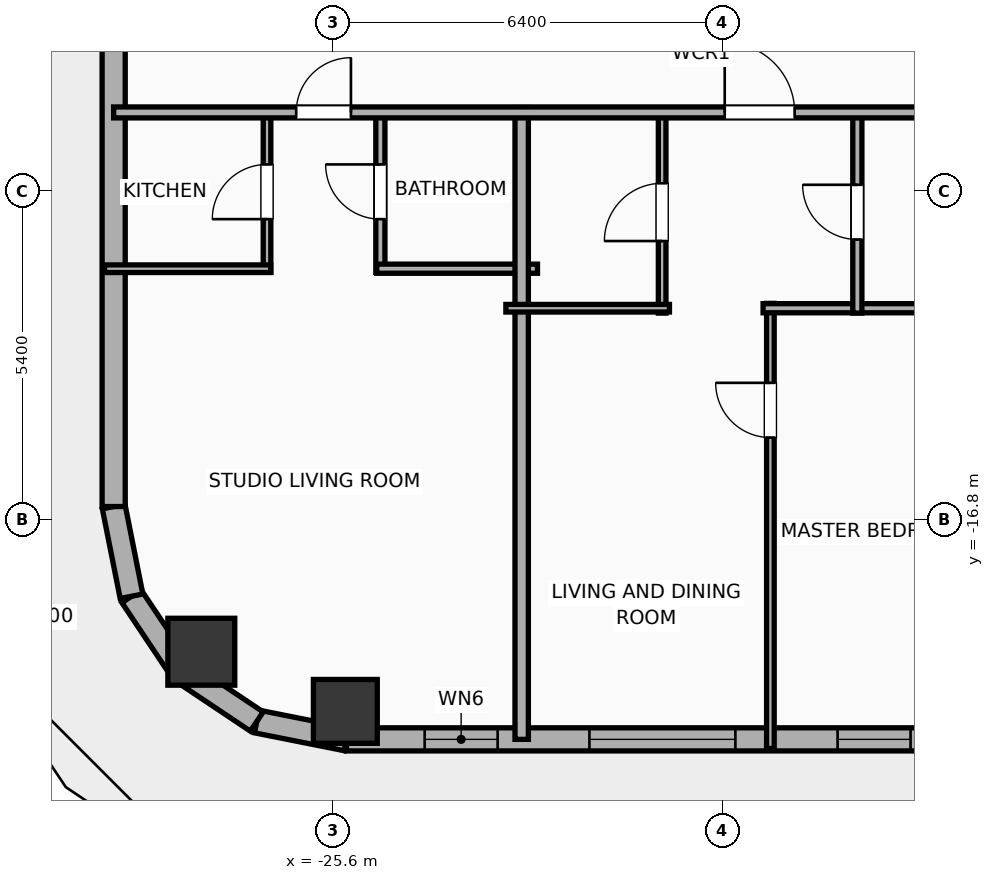
"""IFC4 building model, lengths in metres.
Left out: names, types, materials, properties, quantities, classifications, styles, units other than length and angle.
Written with IfcOpenShell. Run it as: python <this file> out.ifc"""

import sys

from ifc_helpers import new_model, si_unit, direction, frame, frame_2d, origin, origin_2d, place, context, subcontext, project, spatial, rectangle, hollow_rectangle, hollow_circle, extrude, element, fill, save


model = new_model("IFC4")
c1 = context("Model", 3, precision=1e-05, world=origin(), true_north=direction((0.0, 1.0)))
c2 = subcontext(c1, "Body", "Model", "MODEL_VIEW")
j1 = project(units=[si_unit("LENGTHUNIT", "METRE"), si_unit("PLANEANGLEUNIT", "RADIAN")], contexts=[c1])
p1 = place(None, origin())
s1 = spatial("IfcSite", under=j1, at=p1, CompositionType="ELEMENT")
p2 = place(p1, origin())
s2 = spatial("IfcBuilding", under=s1, at=p2, CompositionType="ELEMENT")
p3 = place(p2, frame((0.0, 0.0, 113.1)))
s3 = spatial("IfcBuildingStorey", under=s2, at=p3, CompositionType="ELEMENT", Elevation=113.1)
p4 = place(p3, frame((-25.4, -19.95, 0.0), z_axis=(0.0, 0.0, 1.0), x_axis=(1.0, 0.0, 0.0)))
e1 = element("IfcColumn", 1, at=p4, inside=s3, PredefinedType="COLUMN", context=c2, shape_type="SweptSolid", body=[
    extrude(hollow_rectangle(XDim=1.05, YDim=1.05, WallThickness=0.036, at=origin_2d()), origin(), (0.0, 0.0, 1.0), 3.9),
])
p5 = place(p3, frame((-27.769, -18.969, 0.0), z_axis=(0.0, 0.0, 1.0), x_axis=(1.0, 0.0, 0.0)))
e2 = element("IfcColumn", 2, at=p5, inside=s3, PredefinedType="COLUMN", context=c2, shape_type="SweptSolid", body=[
    extrude(hollow_circle(Radius=0.55, WallThickness=0.036, at=origin_2d()), origin(), (0.0, 0.0, 1.0), 3.9),
])
p6 = place(p3, frame((29.381, -20.41, 0.0), z_axis=(0.0, 0.0, 1.0), x_axis=(-1.0, 0.0, 0.0)))
e3 = element("IfcWall", 3, at=p6, inside=s3, PredefinedType="ELEMENTEDWALL", context=c2, shape_type="SweptSolid", body=[
    extrude(rectangle(XDim=54.763, YDim=0.38, at=frame_2d((27.381, 0.0))), origin(), (0.0, 0.0, 1.0), 3.65),
])
p7 = place(p6, frame((15.679, 0.0, 0.0)))
e4 = element("IfcOpeningElement", 4, at=p7, cuts=e3, PredefinedType="OPENING", context=c2, shape_type="SweptSolid", body=[
    extrude(rectangle(XDim=1.5, YDim=2.05, at=frame_2d((0.75, 1.025))), frame((0.0, 0.2, 0.0), z_axis=(0.0, -1.0, 0.0), x_axis=(1.0, 0.0, 0.0)), (0.0, 0.0, 1.0), 0.4),
])
p8 = place(p6, frame((7.295, 0.0, 0.75)))
e5 = element("IfcOpeningElement", 5, at=p8, cuts=e3, PredefinedType="OPENING", context=c2, shape_type="SweptSolid", body=[
    extrude(rectangle(XDim=2.4, YDim=2.1, at=frame_2d((1.2, 1.05))), frame((0.0, 0.2, 0.0), z_axis=(0.0, -1.0, 0.0), x_axis=(1.0, 0.0, 0.0)), (0.0, 0.0, 1.0), 0.4),
])
p9 = place(p6, frame((18.486, 0.0, 0.75)))
e6 = element("IfcOpeningElement", 6, at=p9, cuts=e3, PredefinedType="OPENING", context=c2, shape_type="SweptSolid", body=[
    extrude(rectangle(XDim=2.4, YDim=2.1, at=frame_2d((1.2, 1.05))), frame((0.0, 0.2, 0.0), z_axis=(0.0, -1.0, 0.0), x_axis=(1.0, 0.0, 0.0)), (0.0, 0.0, 1.0), 0.4),
])
p10 = place(p6, frame((33.877, 0.0, 0.75)))
e7 = element("IfcOpeningElement", 7, at=p10, cuts=e3, PredefinedType="OPENING", context=c2, shape_type="SweptSolid", body=[
    extrude(rectangle(XDim=2.4, YDim=2.1, at=frame_2d((1.2, 1.05))), frame((0.0, 0.2, 0.0), z_axis=(0.0, -1.0, 0.0), x_axis=(1.0, 0.0, 0.0)), (0.0, 0.0, 1.0), 0.4),
])
p11 = place(p6, frame((48.367, 0.0, 0.75)))
e8 = element("IfcOpeningElement", 8, at=p11, cuts=e3, PredefinedType="OPENING", context=c2, shape_type="SweptSolid", body=[
    extrude(rectangle(XDim=2.4, YDim=2.1, at=frame_2d((1.2, 1.05))), frame((0.0, 0.2, 0.0), z_axis=(0.0, -1.0, 0.0), x_axis=(1.0, 0.0, 0.0)), (0.0, 0.0, 1.0), 0.4),
])
p12 = place(p6, frame((37.584, 0.0, 0.0)))
e9 = element("IfcOpeningElement", 9, at=p12, cuts=e3, PredefinedType="OPENING", context=c2, shape_type="SweptSolid", body=[
    extrude(rectangle(XDim=1.5, YDim=2.05, at=frame_2d((0.75, 1.025))), frame((0.0, 0.2, 0.0), z_axis=(0.0, -1.0, 0.0), x_axis=(1.0, 0.0, 0.0)), (0.0, 0.0, 1.0), 0.4),
])
p13 = place(p6, frame((52.277, 0.0, 0.75)))
e10 = element("IfcOpeningElement", 10, at=p13, cuts=e3, PredefinedType="OPENING", context=c2, shape_type="SweptSolid", body=[
    extrude(rectangle(XDim=1.2, YDim=2.05, at=frame_2d((0.6, 1.025))), frame((0.0, 0.2, 0.0), z_axis=(0.0, -1.0, 0.0), x_axis=(1.0, 0.0, 0.0)), (0.0, 0.0, 1.0), 0.4),
])
p14 = place(p6, frame((45.486, 0.0, 0.75)))
e11 = element("IfcOpeningElement", 11, at=p14, cuts=e3, PredefinedType="OPENING", context=c2, shape_type="SweptSolid", body=[
    extrude(rectangle(XDim=1.2, YDim=2.05, at=frame_2d((0.6, 1.025))), frame((0.0, 0.2, 0.0), z_axis=(0.0, -1.0, 0.0), x_axis=(1.0, 0.0, 0.0)), (0.0, 0.0, 1.0), 0.4),
])
p15 = place(p6, frame((41.736, 0.0, 0.75)))
e12 = element("IfcOpeningElement", 12, at=p15, cuts=e3, PredefinedType="OPENING", context=c2, shape_type="SweptSolid", body=[
    extrude(rectangle(XDim=1.2, YDim=2.05, at=frame_2d((0.6, 1.025))), frame((0.0, 0.2, 0.0), z_axis=(0.0, -1.0, 0.0), x_axis=(1.0, 0.0, 0.0)), (0.0, 0.0, 1.0), 0.4),
])
p16 = place(p6, frame((30.486, 0.0, 0.75)))
e13 = element("IfcOpeningElement", 13, at=p16, cuts=e3, PredefinedType="OPENING", context=c2, shape_type="SweptSolid", body=[
    extrude(rectangle(XDim=1.2, YDim=2.05, at=frame_2d((0.6, 1.025))), frame((0.0, 0.2, 0.0), z_axis=(0.0, -1.0, 0.0), x_axis=(1.0, 0.0, 0.0)), (0.0, 0.0, 1.0), 0.4),
])
p17 = place(p6, frame((26.736, 0.0, 0.75)))
e14 = element("IfcOpeningElement", 14, at=p17, cuts=e3, PredefinedType="OPENING", context=c2, shape_type="SweptSolid", body=[
    extrude(rectangle(XDim=1.2, YDim=2.05, at=frame_2d((0.6, 1.025))), frame((0.0, 0.2, 0.0), z_axis=(0.0, -1.0, 0.0), x_axis=(1.0, 0.0, 0.0)), (0.0, 0.0, 1.0), 0.4),
])
p18 = place(p6, frame((22.986, 0.0, 0.75)))
e15 = element("IfcOpeningElement", 15, at=p18, cuts=e3, PredefinedType="OPENING", context=c2, shape_type="SweptSolid", body=[
    extrude(rectangle(XDim=1.2, YDim=2.05, at=frame_2d((0.6, 1.025))), frame((0.0, 0.2, 0.0), z_axis=(0.0, -1.0, 0.0), x_axis=(1.0, 0.0, 0.0)), (0.0, 0.0, 1.0), 0.4),
])
p19 = place(p6, frame((11.736, 0.0, 0.75)))
e16 = element("IfcOpeningElement", 16, at=p19, cuts=e3, PredefinedType="OPENING", context=c2, shape_type="SweptSolid", body=[
    extrude(rectangle(XDim=1.2, YDim=2.05, at=frame_2d((0.6, 1.025))), frame((0.0, 0.2, 0.0), z_axis=(0.0, -1.0, 0.0), x_axis=(1.0, 0.0, 0.0)), (0.0, 0.0, 1.0), 0.4),
])
p20 = place(p6, frame((3.286, 0.0, 0.75)))
e17 = element("IfcOpeningElement", 17, at=p20, cuts=e3, PredefinedType="OPENING", context=c2, shape_type="SweptSolid", body=[
    extrude(rectangle(XDim=1.2, YDim=2.05, at=frame_2d((0.6, 1.025))), frame((0.0, 0.2, 0.0), z_axis=(0.0, -1.0, 0.0), x_axis=(1.0, 0.0, 0.0)), (0.0, 0.0, 1.0), 0.4),
])
p21 = place(p3, frame((-25.381, -20.41, 0.0), z_axis=(0.0, 0.0, 1.0), x_axis=(-0.980786132421, 0.195086038585, 0.0)))
e18 = element("IfcWall", 18, at=p21, inside=s3, PredefinedType="ELEMENTEDWALL", context=c2, shape_type="SweptSolid", body=[
    extrude(rectangle(XDim=1.504, YDim=0.38, at=frame_2d((0.752, 0.0))), origin(), (0.0, 0.0, 1.0), 3.65),
])
p22 = place(p3, frame((-26.857, -20.116, 0.0), z_axis=(0.0, 0.0, 1.0), x_axis=(-0.831468045563, 0.555572577804, 0.0)))
e19 = element("IfcWall", 19, at=p22, inside=s3, PredefinedType="ELEMENTEDWALL", context=c2, shape_type="SweptSolid", body=[
    extrude(rectangle(XDim=1.485, YDim=0.38, at=frame_2d((0.742, 0.0))), origin(), (0.0, 0.0, 1.0), 3.65),
])
p23 = place(p3, frame((-28.091, -19.292, 0.0), z_axis=(0.0, 0.0, 1.0), x_axis=(-0.555610286119, 0.831442848281, 0.0)))
e20 = element("IfcWall", 20, at=p23, inside=s3, PredefinedType="ELEMENTEDWALL", context=c2, shape_type="SweptSolid", body=[
    extrude(rectangle(XDim=1.485, YDim=0.38, at=frame_2d((0.743, 0.0))), origin(), (0.0, 0.0, 1.0), 3.65),
])
p24 = place(p3, frame((-28.917, -18.057, 0.0), z_axis=(0.0, 0.0, 1.0), x_axis=(-0.195086038585, 0.980786132421, 0.0)))
e21 = element("IfcWall", 21, at=p24, inside=s3, PredefinedType="ELEMENTEDWALL", context=c2, shape_type="SweptSolid", body=[
    extrude(rectangle(XDim=1.504, YDim=0.38, at=frame_2d((0.752, 0.0))), origin(), (0.0, 0.0, 1.0), 3.65),
])
p25 = place(p3, frame((-29.21, -16.581, 0.0), z_axis=(0.0, 0.0, 1.0), x_axis=(0.0, 1.0, 0.0)))
e22 = element("IfcWall", 22, at=p25, inside=s3, PredefinedType="ELEMENTEDWALL", context=c2, shape_type="SweptSolid", body=[
    extrude(rectangle(XDim=34.363, YDim=0.38, at=frame_2d((17.181, 0.0))), origin(), (0.0, 0.0, 1.0), 3.65),
])
p26 = place(p25, frame((30.757, 0.0, 0.75)))
e23 = element("IfcOpeningElement", 23, at=p26, cuts=e22, PredefinedType="OPENING", context=c2, shape_type="SweptSolid", body=[
    extrude(rectangle(XDim=1.2, YDim=2.05, at=frame_2d((0.6, 1.025))), frame((0.0, 0.2, 0.0), z_axis=(0.0, -1.0, 0.0), x_axis=(1.0, 0.0, 0.0)), (0.0, 0.0, 1.0), 0.4),
])
p27 = place(p25, frame((20.326, 0.0, 0.75)))
e24 = element("IfcOpeningElement", 24, at=p27, cuts=e22, PredefinedType="OPENING", context=c2, shape_type="SweptSolid", body=[
    extrude(rectangle(XDim=1.2, YDim=2.05, at=frame_2d((0.6, 1.025))), frame((0.0, 0.2, 0.0), z_axis=(0.0, -1.0, 0.0), x_axis=(1.0, 0.0, 0.0)), (0.0, 0.0, 1.0), 0.4),
])
p28 = place(p25, frame((11.776, 0.0, 0.75)))
e25 = element("IfcOpeningElement", 25, at=p28, cuts=e22, PredefinedType="OPENING", context=c2, shape_type="SweptSolid", body=[
    extrude(rectangle(XDim=1.2, YDim=2.05, at=frame_2d((0.6, 1.025))), frame((0.0, 0.2, 0.0), z_axis=(0.0, -1.0, 0.0), x_axis=(1.0, 0.0, 0.0)), (0.0, 0.0, 1.0), 0.4),
])
p29 = place(p3, frame((-26.688, -12.73, 0.0), z_axis=(0.0, 0.0, 1.0), x_axis=(0.0, 1.0, 0.0)))
e26 = element("IfcWall", 26, at=p29, inside=s3, PredefinedType="PARTITIONING", context=c2, shape_type="SweptSolid", body=[
    extrude(rectangle(XDim=2.65, YDim=0.125, at=frame_2d((1.325, 0.0))), origin(), (0.0, 0.0, 1.0), 3.65),
])
p30 = place(p29, frame((0.875, 0.0, 0.0)))
e27 = element("IfcOpeningElement", 27, at=p30, cuts=e26, PredefinedType="OPENING", context=c2, shape_type="SweptSolid", body=[
    extrude(rectangle(XDim=0.9, YDim=2.05, at=frame_2d((0.45, 1.025))), frame((0.0, 0.073, 0.0), z_axis=(0.0, -1.0, 0.0), x_axis=(1.0, 0.0, 0.0)), (0.0, 0.0, 1.0), 0.145),
])
p31 = place(p3, frame((-24.824, -12.73, 0.0), z_axis=(0.0, 0.0, 1.0), x_axis=(0.0, 1.0, 0.0)))
e28 = element("IfcWall", 28, at=p31, inside=s3, PredefinedType="PLUMBINGWALL", context=c2, shape_type="SweptSolid", body=[
    extrude(rectangle(XDim=2.65, YDim=0.15, at=frame_2d((1.325, 0.0))), origin(), (0.0, 0.0, 1.0), 3.65),
])
p32 = place(p31, frame((0.875, 0.0, 0.0)))
e29 = element("IfcOpeningElement", 29, at=p32, cuts=e28, PredefinedType="OPENING", context=c2, shape_type="SweptSolid", body=[
    extrude(rectangle(XDim=0.9, YDim=2.05, at=frame_2d((0.45, 1.025))), frame((0.0, 0.085, 0.0), z_axis=(0.0, -1.0, 0.0), x_axis=(1.0, 0.0, 0.0)), (0.0, 0.0, 1.0), 0.17),
])
p33 = place(p3, frame((-29.36, -12.67, 0.0), z_axis=(0.0, 0.0, 1.0), x_axis=(1.0, 0.0, 0.0)))
e30 = element("IfcWall", 30, at=p33, inside=s3, PredefinedType="PARTITIONING", context=c2, shape_type="SweptSolid", body=[
    extrude(rectangle(XDim=2.732, YDim=0.125, at=frame_2d((1.366, 0.0))), origin(), (0.0, 0.0, 1.0), 3.65),
])
p34 = place(p3, frame((-24.884, -12.67, 0.0), z_axis=(0.0, 0.0, 1.0), x_axis=(1.0, 0.0, 0.0)))
e31 = element("IfcWall", 31, at=p34, inside=s3, PredefinedType="PLUMBINGWALL", context=c2, shape_type="SweptSolid", body=[
    extrude(rectangle(XDim=2.644, YDim=0.15, at=frame_2d((1.322, 0.0))), origin(), (0.0, 0.0, 1.0), 3.65),
])
p35 = place(p3, frame((-22.5, -20.41, 0.0), z_axis=(0.0, 0.0, 1.0), x_axis=(0.0, 1.0, 0.0)))
e32 = element("IfcWall", 32, at=p35, inside=s3, PredefinedType="PARTITIONING", context=c2, shape_type="SweptSolid", body=[
    extrude(rectangle(XDim=10.39, YDim=0.22, at=frame_2d((5.195, 0.0))), origin(), (0.0, 0.0, 1.0), 3.65),
])
p36 = place(p3, frame((-18.41, -20.56, 0.0), z_axis=(0.0, 0.0, 1.0), x_axis=(0.0, 1.0, 0.0)))
e33 = element("IfcWall", 33, at=p36, inside=s3, PredefinedType="PARTITIONING", context=c2, shape_type="SweptSolid", body=[
    extrude(rectangle(XDim=7.32, YDim=0.125, at=frame_2d((3.66, 0.0))), origin(), (0.0, 0.0, 1.0), 3.65),
])
p37 = place(p36, frame((5.113, 0.0, 0.0)))
e34 = element("IfcOpeningElement", 34, at=p37, cuts=e33, PredefinedType="OPENING", context=c2, shape_type="SweptSolid", body=[
    extrude(rectangle(XDim=0.9, YDim=2.05, at=frame_2d((0.45, 1.025))), frame((0.0, 0.073, 0.0), z_axis=(0.0, -1.0, 0.0), x_axis=(1.0, 0.0, 0.0)), (0.0, 0.0, 1.0), 0.145),
])
p38 = place(p3, frame((-18.53, -13.32, 0.0), z_axis=(0.0, 0.0, 1.0), x_axis=(1.0, 0.0, 0.0)))
e35 = element("IfcWall", 35, at=p38, inside=s3, PredefinedType="PLUMBINGWALL", context=c2, shape_type="SweptSolid", body=[
    extrude(rectangle(XDim=3.605, YDim=0.15, at=frame_2d((1.802, 0.0))), origin(), (0.0, 0.0, 1.0), 3.65),
])
p39 = place(p3, frame((-20.19, -13.4, 0.0), z_axis=(0.0, 0.0, 1.0), x_axis=(0.0, 1.0, 0.0)))
e36 = element("IfcWall", 36, at=p39, inside=s3, PredefinedType="PARTITIONING", context=c2, shape_type="SweptSolid", body=[
    extrude(rectangle(XDim=3.32, YDim=0.125, at=frame_2d((1.66, 0.0))), origin(), (0.0, 0.0, 1.0), 3.65),
])
p40 = place(p39, frame((1.185, 0.0, 0.0)))
e37 = element("IfcOpeningElement", 37, at=p40, cuts=e36, PredefinedType="OPENING", context=c2, shape_type="SweptSolid", body=[
    extrude(rectangle(XDim=0.95, YDim=2.05, at=frame_2d((0.475, 1.025))), frame((0.0, 0.073, 0.0), z_axis=(0.0, -1.0, 0.0), x_axis=(1.0, 0.0, 0.0)), (0.0, 0.0, 1.0), 0.145),
])
p41 = place(p3, frame((-22.76, -13.32, 0.0), z_axis=(0.0, 0.0, 1.0), x_axis=(1.0, 0.0, 0.0)))
e38 = element("IfcWall", 38, at=p41, inside=s3, PredefinedType="PARTITIONING", context=c2, shape_type="SweptSolid", body=[
    extrude(rectangle(XDim=2.69, YDim=0.125, at=frame_2d((1.345, 0.0))), origin(), (0.0, 0.0, 1.0), 3.65),
])
p42 = place(p3, frame((-16.98, -13.4, 0.0), z_axis=(0.0, 0.0, 1.0), x_axis=(0.0, 1.0, 0.0)))
e39 = element("IfcWall", 39, at=p42, inside=s3, PredefinedType="PLUMBINGWALL", context=c2, shape_type="SweptSolid", body=[
    extrude(rectangle(XDim=3.32, YDim=0.15, at=frame_2d((1.66, 0.0))), origin(), (0.0, 0.0, 1.0), 3.65),
])
p43 = place(p42, frame((1.21, 0.0, 0.0)))
e40 = element("IfcOpeningElement", 40, at=p43, cuts=e39, PredefinedType="OPENING", context=c2, shape_type="SweptSolid", body=[
    extrude(rectangle(XDim=0.9, YDim=2.05, at=frame_2d((0.45, 1.025))), frame((0.0, 0.085, 0.0), z_axis=(0.0, -1.0, 0.0), x_axis=(1.0, 0.0, 0.0)), (0.0, 0.0, 1.0), 0.17),
])
p44 = place(p3, frame((-29.21, -10.1, 0.0), z_axis=(0.0, 0.0, 1.0), x_axis=(1.0, 0.0, 0.0)))
e41 = element("IfcWall", 41, at=p44, inside=s3, PredefinedType="PARTITIONING", context=c2, shape_type="SweptSolid", body=[
    extrude(rectangle(XDim=62.42, YDim=0.18, at=frame_2d((31.21, 0.0))), origin(), (0.0, 0.0, 1.0), 3.65),
])
p45 = place(p44, frame((3.002, 0.0, 0.0)))
e42 = element("IfcOpeningElement", 42, at=p45, cuts=e41, PredefinedType="OPENING", context=c2, shape_type="SweptSolid", body=[
    extrude(rectangle(XDim=0.9, YDim=2.05, at=frame_2d((0.45, 1.025))), frame((0.0, 0.1, 0.0), z_axis=(0.0, -1.0, 0.0), x_axis=(1.0, 0.0, 0.0)), (0.0, 0.0, 1.0), 0.2),
])
p46 = place(p44, frame((10.049, 0.0, 0.0)))
e43 = element("IfcOpeningElement", 43, at=p46, cuts=e41, PredefinedType="OPENING", context=c2, shape_type="SweptSolid", body=[
    extrude(rectangle(XDim=1.15, YDim=2.05, at=frame_2d((0.575, 1.025))), frame((0.0, 0.1, 0.0), z_axis=(0.0, -1.0, 0.0), x_axis=(1.0, 0.0, 0.0)), (0.0, 0.0, 1.0), 0.2),
])
p47 = place(p44, frame((17.552, 0.0, 0.0)))
e44 = element("IfcOpeningElement", 44, at=p47, cuts=e41, PredefinedType="OPENING", context=c2, shape_type="SweptSolid", body=[
    extrude(rectangle(XDim=1.15, YDim=2.05, at=frame_2d((0.575, 1.025))), frame((0.0, 0.1, 0.0), z_axis=(0.0, -1.0, 0.0), x_axis=(1.0, 0.0, 0.0)), (0.0, 0.0, 1.0), 0.2),
])
p48 = place(p44, frame((25.048, 0.0, 0.0)))
e45 = element("IfcOpeningElement", 45, at=p48, cuts=e41, PredefinedType="OPENING", context=c2, shape_type="SweptSolid", body=[
    extrude(rectangle(XDim=1.15, YDim=2.05, at=frame_2d((0.575, 1.025))), frame((0.0, 0.1, 0.0), z_axis=(0.0, -1.0, 0.0), x_axis=(1.0, 0.0, 0.0)), (0.0, 0.0, 1.0), 0.2),
])
p49 = place(p44, frame((32.551, 0.0, 0.0)))
e46 = element("IfcOpeningElement", 46, at=p49, cuts=e41, PredefinedType="OPENING", context=c2, shape_type="SweptSolid", body=[
    extrude(rectangle(XDim=1.15, YDim=2.05, at=frame_2d((0.575, 1.025))), frame((0.0, 0.1, 0.0), z_axis=(0.0, -1.0, 0.0), x_axis=(1.0, 0.0, 0.0)), (0.0, 0.0, 1.0), 0.2),
])
p50 = place(p44, frame((40.048, 0.0, 0.0)))
e47 = element("IfcOpeningElement", 47, at=p50, cuts=e41, PredefinedType="OPENING", context=c2, shape_type="SweptSolid", body=[
    extrude(rectangle(XDim=1.15, YDim=2.05, at=frame_2d((0.575, 1.025))), frame((0.0, 0.1, 0.0), z_axis=(0.0, -1.0, 0.0), x_axis=(1.0, 0.0, 0.0)), (0.0, 0.0, 1.0), 0.2),
])
p51 = place(p44, frame((47.551, 0.0, 0.0)))
e48 = element("IfcOpeningElement", 48, at=p51, cuts=e41, PredefinedType="OPENING", context=c2, shape_type="SweptSolid", body=[
    extrude(rectangle(XDim=1.15, YDim=2.05, at=frame_2d((0.575, 1.025))), frame((0.0, 0.1, 0.0), z_axis=(0.0, -1.0, 0.0), x_axis=(1.0, 0.0, 0.0)), (0.0, 0.0, 1.0), 0.2),
])
p52 = place(p44, frame((57.064, 0.0, 0.0)))
e49 = element("IfcOpeningElement", 49, at=p52, cuts=e41, PredefinedType="OPENING", context=c2, shape_type="SweptSolid", body=[
    extrude(rectangle(XDim=1.15, YDim=2.05, at=frame_2d((0.575, 1.025))), frame((0.0, 0.1, 0.0), z_axis=(0.0, -1.0, 0.0), x_axis=(1.0, 0.0, 0.0)), (0.0, 0.0, 1.0), 0.2),
])
p53 = place(p11, origin())
e50 = element("IfcWindow", 50, at=p53, inside=s3, PartitioningType="SINGLE_PANEL", PredefinedType="WINDOW", context=c2, shape_type="SweptSolid", body=[
    extrude(rectangle(XDim=2.4, YDim=2.1, at=frame_2d((1.2, 1.05))), frame((0.0, 0.03, 0.0), z_axis=(0.0, -1.0, 0.0), x_axis=(1.0, 0.0, 0.0)), (0.0, 0.0, 1.0), 0.06),
])
fill(e8, e50)
p54 = place(p13, origin())
e51 = element("IfcWindow", 51, at=p54, inside=s3, PartitioningType="SINGLE_PANEL", PredefinedType="WINDOW", context=c2, shape_type="SweptSolid", body=[
    extrude(rectangle(XDim=1.2, YDim=2.05, at=frame_2d((0.6, 1.025))), frame((0.0, 0.03, 0.0), z_axis=(0.0, -1.0, 0.0), x_axis=(1.0, 0.0, 0.0)), (0.0, 0.0, 1.0), 0.06),
])
fill(e10, e51)
p55 = place(p14, origin())
e52 = element("IfcWindow", 52, at=p55, inside=s3, PartitioningType="SINGLE_PANEL", PredefinedType="WINDOW", context=c2, shape_type="SweptSolid", body=[
    extrude(rectangle(XDim=1.2, YDim=2.05, at=frame_2d((0.6, 1.025))), frame((0.0, 0.03, 0.0), z_axis=(0.0, -1.0, 0.0), x_axis=(1.0, 0.0, 0.0)), (0.0, 0.0, 1.0), 0.06),
])
fill(e11, e52)
p56 = place(p30, origin())
e53 = element("IfcDoor", 53, at=p56, inside=s3, OperationType="SINGLE_SWING_LEFT", PredefinedType="DOOR", context=c2, shape_type="SweptSolid", body=[
    extrude(rectangle(XDim=0.9, YDim=2.05, at=frame_2d((0.45, 1.025))), frame((0.0, 0.025, 0.0), z_axis=(0.0, -1.0, 0.0), x_axis=(1.0, 0.0, 0.0)), (0.0, 0.0, 1.0), 0.05),
])
fill(e27, e53)
p57 = place(p32, origin())
e54 = element("IfcDoor", 54, at=p57, inside=s3, OperationType="SINGLE_SWING_RIGHT", PredefinedType="DOOR", context=c2, shape_type="SweptSolid", body=[
    extrude(rectangle(XDim=0.9, YDim=2.05, at=frame_2d((0.45, 1.025))), frame((0.0, 0.025, 0.0), z_axis=(0.0, -1.0, 0.0), x_axis=(1.0, 0.0, 0.0)), (0.0, 0.0, 1.0), 0.05),
])
fill(e29, e54)
p58 = place(p37, origin())
e55 = element("IfcDoor", 55, at=p58, inside=s3, OperationType="SINGLE_SWING_RIGHT", PredefinedType="DOOR", context=c2, shape_type="SweptSolid", body=[
    extrude(rectangle(XDim=0.9, YDim=2.05, at=frame_2d((0.45, 1.025))), frame((0.0, 0.025, 0.0), z_axis=(0.0, -1.0, 0.0), x_axis=(1.0, 0.0, 0.0)), (0.0, 0.0, 1.0), 0.05),
])
fill(e34, e55)
p59 = place(p40, origin())
e56 = element("IfcDoor", 56, at=p59, inside=s3, OperationType="SINGLE_SWING_LEFT", PredefinedType="DOOR", context=c2, shape_type="SweptSolid", body=[
    extrude(rectangle(XDim=0.95, YDim=2.05, at=frame_2d((0.475, 1.025))), frame((0.0, 0.025, 0.0), z_axis=(0.0, -1.0, 0.0), x_axis=(1.0, 0.0, 0.0)), (0.0, 0.0, 1.0), 0.05),
])
fill(e37, e56)
p60 = place(p43, origin())
e57 = element("IfcDoor", 57, at=p60, inside=s3, OperationType="SINGLE_SWING_RIGHT", PredefinedType="DOOR", context=c2, shape_type="SweptSolid", body=[
    extrude(rectangle(XDim=0.9, YDim=2.05, at=frame_2d((0.45, 1.025))), frame((0.0, 0.025, 0.0), z_axis=(0.0, -1.0, 0.0), x_axis=(1.0, 0.0, 0.0)), (0.0, 0.0, 1.0), 0.05),
])
fill(e40, e57)
p61 = place(p45, origin())
e58 = element("IfcDoor", 58, at=p61, inside=s3, OperationType="SINGLE_SWING_RIGHT", PredefinedType="DOOR", context=c2, shape_type="SweptSolid", body=[
    extrude(rectangle(XDim=0.9, YDim=2.05, at=frame_2d((0.45, 1.025))), frame((0.0, 0.025, 0.0), z_axis=(0.0, -1.0, 0.0), x_axis=(1.0, 0.0, 0.0)), (0.0, 0.0, 1.0), 0.05),
])
fill(e42, e58)
p62 = place(p46, origin())
e59 = element("IfcDoor", 59, at=p62, inside=s3, OperationType="SINGLE_SWING_LEFT", PredefinedType="DOOR", context=c2, shape_type="SweptSolid", body=[
    extrude(rectangle(XDim=1.15, YDim=2.05, at=frame_2d((0.575, 1.025))), frame((0.0, 0.025, 0.0), z_axis=(0.0, -1.0, 0.0), x_axis=(1.0, 0.0, 0.0)), (0.0, 0.0, 1.0), 0.05),
])
fill(e43, e59)
save(model, sys.argv[1])
